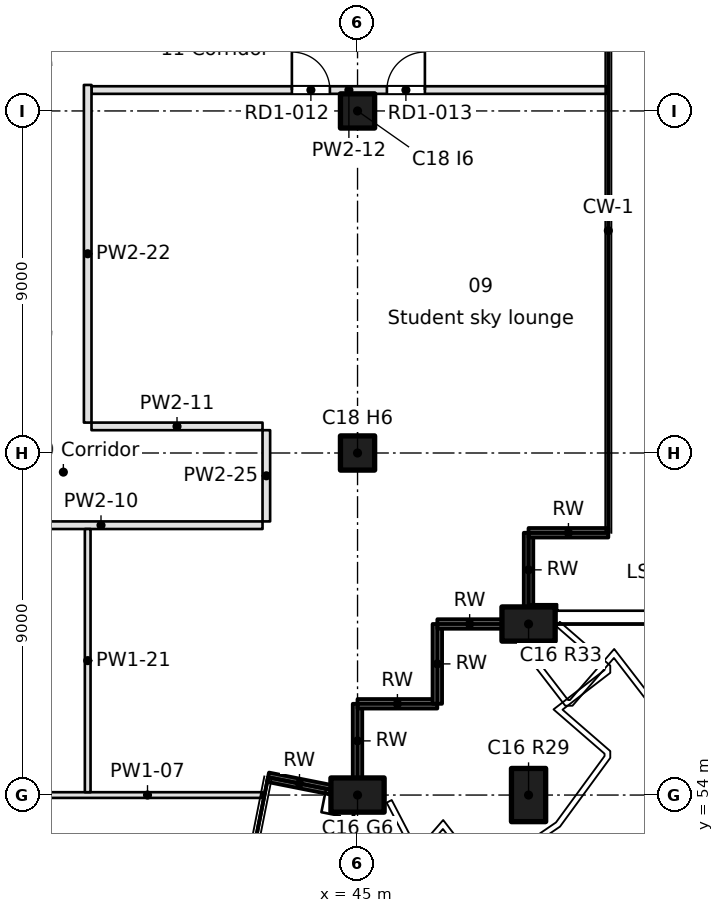
"""IFC4 building model, lengths in metres.
Left out: names, types, materials, properties, quantities, classifications, styles, units other than length and angle.
Written with IfcOpenShell. Run it as: python <this file> out.ifc"""

import sys

from ifc_helpers import new_model, si_unit, direction, frame, frame_2d, origin, origin_2d, place, context, subcontext, project, spatial, rectangle, extrude, element, fill, save


model = new_model("IFC4")
c1 = context("Model", 3, precision=1e-05, world=origin(), true_north=direction((0.0, 1.0)))
c2 = subcontext(c1, "Body", "Model", "MODEL_VIEW")
j1 = project(units=[si_unit("LENGTHUNIT", "METRE"), si_unit("PLANEANGLEUNIT", "RADIAN")], contexts=[c1])
p1 = place(None, origin())
s1 = spatial("IfcSite", under=j1, at=p1, CompositionType="ELEMENT")
p2 = place(p1, origin())
s2 = spatial("IfcBuilding", under=s1, at=p2, CompositionType="ELEMENT")
p3 = place(p2, frame((0.0, 0.0, 291.9)))
s3 = spatial("IfcBuildingStorey", under=s2, at=p3, CompositionType="ELEMENT", Elevation=291.9)
for number, where, z_axis, x_axis in (
    (1, (45.0, 54.0, 0.0), (0.0, 0.0, 1.0), (1.0, 0.0, 0.0)),
    (2, (49.5, 54.0, 0.0), (0.0, 0.0, 1.0), (0.0, 1.0, 0.0)),
    (3, (49.5, 58.5, 0.0), (0.0, 0.0, 1.0), (1.0, 0.0, 0.0)),
):
    element("IfcColumn", number, at=place(p3, frame(where, z_axis=z_axis, x_axis=x_axis)), inside=s3, PredefinedType="COLUMN", context=c2, shape_type="SweptSolid", body=[
        extrude(rectangle(XDim=1.4, YDim=0.9, at=origin_2d()), origin(), (0.0, 0.0, 1.0), 3.7),
    ])
for number, where, z_axis, x_axis in (
    (4, (45.0, 63.0, 0.0), (0.0, 0.0, 1.0), (1.0, 0.0, 0.0)),
    (5, (45.0, 72.0, 0.0), (0.0, 0.0, 1.0), (1.0, 0.0, 0.0)),
):
    element("IfcColumn", number, at=place(p3, frame(where, z_axis=z_axis, x_axis=x_axis)), inside=s3, PredefinedType="COLUMN", context=c2, shape_type="SweptSolid", body=[
        extrude(rectangle(XDim=0.9, YDim=0.9, at=origin_2d()), origin(), (0.0, 0.0, 1.0), 3.7),
    ])
p4 = place(p3, frame((42.645, 54.469, 0.0), z_axis=(0.0, 0.0, 1.0), x_axis=(0.980846923473, -0.194780165092, 0.0)))
e6 = element("IfcWall", 6, at=p4, inside=s3, PredefinedType="SOLIDWALL", context=c2, shape_type="SweptSolid", body=[
    extrude(rectangle(XDim=1.687, YDim=0.25, at=frame_2d((0.844, 0.0))), origin(), (0.0, 0.0, 1.0), 3.3),
])
p5 = place(p3, frame((44.999, 54.45, 0.0), z_axis=(0.0, 0.0, 1.0), x_axis=(0.000125156445, 0.999999992168, 0.0)))
e7 = element("IfcWall", 7, at=p5, inside=s3, PredefinedType="SOLIDWALL", context=c2, shape_type="SweptSolid", body=[
    extrude(rectangle(XDim=1.951, YDim=0.25, at=frame_2d((0.975, 0.0))), origin(), (0.0, 0.0, 1.0), 3.3),
])
p6 = place(p3, frame((44.999, 56.401, 0.0), z_axis=(0.0, 0.0, 1.0), x_axis=(0.999999993241, 0.00011626555, 0.0)))
e8 = element("IfcWall", 8, at=p6, inside=s3, PredefinedType="SOLIDWALL", context=c2, shape_type="SweptSolid", body=[
    extrude(rectangle(XDim=2.1, YDim=0.25, at=frame_2d((1.05, 0.0))), origin(), (0.0, 0.0, 1.0), 3.3),
])
p7 = place(p3, frame((47.099, 56.401, 0.0), z_axis=(0.0, 0.0, 1.0), x_axis=(0.000232504063, 0.999999972971, 0.0)))
e9 = element("IfcWall", 9, at=p7, inside=s3, PredefinedType="SOLIDWALL", context=c2, shape_type="SweptSolid", body=[
    extrude(rectangle(XDim=2.1, YDim=0.25, at=frame_2d((1.05, 0.0))), origin(), (0.0, 0.0, 1.0), 3.3),
])
p8 = place(p3, frame((47.1, 58.501, 0.0), z_axis=(0.0, 0.0, 1.0), x_axis=(1.0, 0.0, 0.0)))
e10 = element("IfcWall", 10, at=p8, inside=s3, PredefinedType="SOLIDWALL", context=c2, shape_type="SweptSolid", body=[
    extrude(rectangle(XDim=1.7, YDim=0.25, at=frame_2d((0.85, 0.0))), origin(), (0.0, 0.0, 1.0), 3.3),
])
p9 = place(p3, frame((49.499, 58.95, 0.0), z_axis=(0.0, 0.0, 1.0), x_axis=(0.000250281559, 0.99999996868, 0.0)))
e11 = element("IfcWall", 11, at=p9, inside=s3, PredefinedType="SOLIDWALL", context=c2, shape_type="SweptSolid", body=[
    extrude(rectangle(XDim=1.951, YDim=0.25, at=frame_2d((0.976, 0.0))), origin(), (0.0, 0.0, 1.0), 3.3),
])
p10 = place(p3, frame((49.5, 60.901, 0.0), z_axis=(0.0, 0.0, 1.0), x_axis=(1.0, 0.0, 0.0)))
e12 = element("IfcWall", 12, at=p10, inside=s3, PredefinedType="SOLIDWALL", context=c2, shape_type="SweptSolid", body=[
    extrude(rectangle(XDim=2.1, YDim=0.25, at=frame_2d((1.05, 0.0))), origin(), (0.0, 0.0, 1.0), 3.3),
])
p11 = place(p3, frame((36.45, 54.0, 0.0), z_axis=(0.0, 0.0, 1.0), x_axis=(1.0, 0.0, 0.0)))
e13 = element("IfcWall", 13, at=p11, inside=s3, PredefinedType="PARTITIONING", context=c2, shape_type="SweptSolid", body=[
    extrude(rectangle(XDim=6.047, YDim=0.15, at=frame_2d((3.023, 0.0))), origin(), (0.0, 0.0, 1.0), 3.3),
])
p12 = place(p3, frame((42.5, 61.1, 0.0), z_axis=(0.0, 0.0, 1.0), x_axis=(-1.0, 0.0, 0.0)))
e14 = element("IfcWall", 14, at=p12, inside=s3, PredefinedType="PARTITIONING", context=c2, shape_type="SweptSolid", body=[
    extrude(rectangle(XDim=8.5, YDim=0.2, at=frame_2d((4.25, 0.0))), origin(), (0.0, 0.0, 1.0), 3.3),
])
p13 = place(p3, frame((38.0, 63.7, 0.0), z_axis=(0.0, 0.0, 1.0), x_axis=(1.0, 0.0, 0.0)))
e15 = element("IfcWall", 15, at=p13, inside=s3, PredefinedType="PARTITIONING", context=c2, shape_type="SweptSolid", body=[
    extrude(rectangle(XDim=4.5, YDim=0.2, at=frame_2d((2.25, 0.0))), origin(), (0.0, 0.0, 1.0), 3.3),
])
p14 = place(p3, frame((51.545, 72.55, 0.0), z_axis=(0.0, 0.0, 1.0), x_axis=(-1.0, 0.0, 0.0)))
e16 = element("IfcWall", 16, at=p14, inside=s3, PredefinedType="PARTITIONING", context=c2, shape_type="SweptSolid", body=[
    extrude(rectangle(XDim=13.545, YDim=0.2, at=frame_2d((6.772, 0.0))), origin(), (0.0, 0.0, 1.0), 3.3),
])
p15 = place(p14, frame((7.272, 0.0, 0.0)))
e17 = element("IfcOpeningElement", 17, at=p15, cuts=e16, PredefinedType="OPENING", context=c2, shape_type="SweptSolid", body=[
    extrude(rectangle(XDim=1.0, YDim=2.1, at=frame_2d((0.5, 1.05))), frame((0.0, 0.1, 0.0), z_axis=(0.0, -1.0, 0.0), x_axis=(1.0, 0.0, 0.0)), (0.0, 0.0, 1.0), 0.2),
])
p16 = place(p14, frame((4.772, 0.0, 0.0)))
e18 = element("IfcOpeningElement", 18, at=p16, cuts=e16, PredefinedType="OPENING", context=c2, shape_type="SweptSolid", body=[
    extrude(rectangle(XDim=1.0, YDim=2.1, at=frame_2d((0.5, 1.05))), frame((0.0, 0.1, 0.0), z_axis=(0.0, -1.0, 0.0), x_axis=(1.0, 0.0, 0.0)), (0.0, 0.0, 1.0), 0.2),
])
p17 = place(p3, frame((37.9, 61.0, 0.0), z_axis=(0.0, 0.0, 1.0), x_axis=(0.0, -1.0, 0.0)))
e19 = element("IfcWall", 19, at=p17, inside=s3, PredefinedType="PARTITIONING", context=c2, shape_type="SweptSolid", body=[
    extrude(rectangle(XDim=6.925, YDim=0.15, at=frame_2d((3.462, 0.0))), origin(), (0.0, 0.0, 1.0), 3.3),
])
p18 = place(p3, frame((37.9, 72.684, 0.0), z_axis=(0.0, 0.0, 1.0), x_axis=(0.0, -1.0, 0.0)))
e20 = element("IfcWall", 20, at=p18, inside=s3, PredefinedType="PARTITIONING", context=c2, shape_type="SweptSolid", body=[
    extrude(rectangle(XDim=8.884, YDim=0.2, at=frame_2d((4.442, 0.0))), origin(), (0.0, 0.0, 1.0), 3.3),
])
p19 = place(p3, frame((42.6, 63.6, 0.0), z_axis=(0.0, 0.0, 1.0), x_axis=(0.0, -1.0, 0.0)))
e21 = element("IfcWall", 21, at=p19, inside=s3, PredefinedType="PARTITIONING", context=c2, shape_type="SweptSolid", body=[
    extrude(rectangle(XDim=2.4, YDim=0.2, at=frame_2d((1.2, 0.0))), origin(), (0.0, 0.0, 1.0), 3.3),
])
p20 = place(p15, frame((1.0, 0.0, 0.0), z_axis=(0.0, 0.0, 1.0), x_axis=(-1.0, 0.0, 0.0)))
e22 = element("IfcDoor", 22, at=p20, inside=s3, OperationType="SINGLE_SWING_LEFT", PredefinedType="DOOR", context=c2, shape_type="SweptSolid", body=[
    extrude(rectangle(XDim=1.0, YDim=2.1, at=frame_2d((0.5, 1.05))), frame((0.0, 0.025, 0.0), z_axis=(0.0, -1.0, 0.0), x_axis=(1.0, 0.0, 0.0)), (0.0, 0.0, 1.0), 0.05),
])
fill(e17, e22)
p21 = place(p16, frame((1.0, 0.0, 0.0), z_axis=(0.0, 0.0, 1.0), x_axis=(-1.0, 0.0, 0.0)))
e23 = element("IfcDoor", 23, at=p21, inside=s3, OperationType="SINGLE_SWING_RIGHT", PredefinedType="DOOR", context=c2, shape_type="SweptSolid", body=[
    extrude(rectangle(XDim=1.0, YDim=2.1, at=frame_2d((0.5, 1.05))), frame((0.0, 0.025, 0.0), z_axis=(0.0, -1.0, 0.0), x_axis=(1.0, 0.0, 0.0)), (0.0, 0.0, 1.0), 0.05),
])
fill(e18, e23)
save(model, sys.argv[1])
